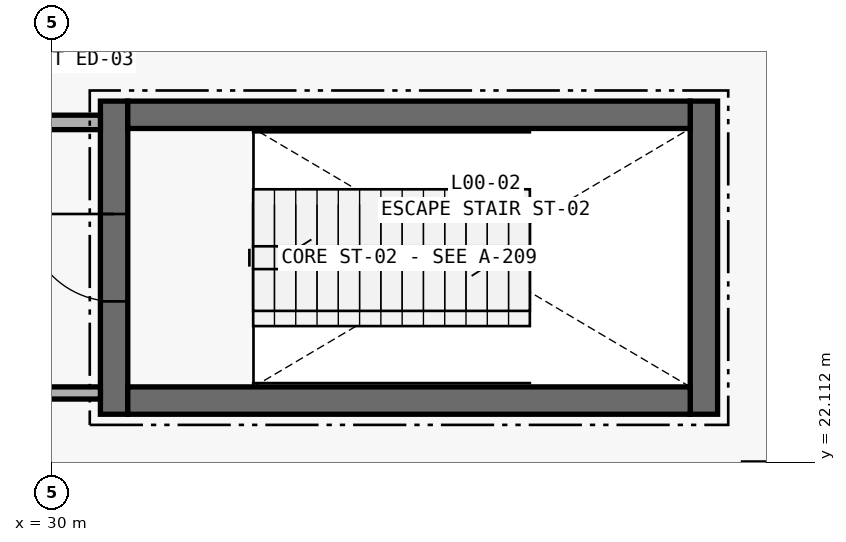
"""IFC4 building model, lengths in metres.
Left out: names, types, materials, properties, quantities, classifications, styles, units other than length and angle.
Written with IfcOpenShell. Run it as: python <this file> out.ifc"""

import sys

from ifc_helpers import new_model, si_unit, direction, frame, frame_2d, origin, place, context, subcontext, project, spatial, rectangle, extrude, element, fill, save


model = new_model("IFC4")
c1 = context("Model", 3, precision=1e-05, world=origin(), true_north=direction((0.0, 1.0)))
c2 = subcontext(c1, "Body", "Model", "MODEL_VIEW")
j1 = project(units=[si_unit("LENGTHUNIT", "METRE"), si_unit("PLANEANGLEUNIT", "RADIAN")], contexts=[c1])
p1 = place(None, origin())
s1 = spatial("IfcSite", under=j1, at=p1, CompositionType="ELEMENT")
p2 = place(p1, origin())
s2 = spatial("IfcBuilding", under=s1, at=p2, CompositionType="ELEMENT")
p3 = place(p2, origin())
s3 = spatial("IfcBuildingStorey", under=s2, at=p3, CompositionType="ELEMENT", Elevation=0.0)
p4 = place(p3, frame((30.82, 22.74, 0.0), z_axis=(0.0, 0.0, 1.0), x_axis=(0.0, 1.0, 0.0)))
e1 = element("IfcWall", 1, at=p4, inside=s3, PredefinedType="SHEAR", context=c2, shape_type="SweptSolid", body=[
    extrude(rectangle(XDim=4.12, YDim=0.36, at=frame_2d((2.06, 0.0))), origin(), (0.0, 0.0, 1.0), 4.5),
])
p5 = place(p4, frame((1.485, 0.0, 0.0)))
e2 = element("IfcOpeningElement", 2, at=p5, cuts=e1, PredefinedType="OPENING", context=c2, shape_type="SweptSolid", body=[
    extrude(rectangle(XDim=1.15, YDim=2.15, at=frame_2d((0.575, 1.075))), frame((0.0, 0.195, 0.0), z_axis=(0.0, -1.0, 0.0), x_axis=(1.0, 0.0, 0.0)), (0.0, 0.0, 1.0), 0.39),
])
p6 = place(p3, frame((38.58, 22.74, 0.0), z_axis=(0.0, 0.0, 1.0), x_axis=(0.0, 1.0, 0.0)))
e3 = element("IfcWall", 3, at=p6, inside=s3, PredefinedType="SHEAR", context=c2, shape_type="SweptSolid", body=[
    extrude(rectangle(XDim=4.12, YDim=0.36, at=frame_2d((2.06, 0.0))), origin(), (0.0, 0.0, 1.0), 4.5),
])
for number, where, z_axis, x_axis in (
    (4, (31.0, 26.68, 0.0), (0.0, 0.0, 1.0), (1.0, 0.0, 0.0)),
    (5, (31.0, 22.92, 0.0), (0.0, 0.0, 1.0), (1.0, 0.0, 0.0)),
):
    element("IfcWall", number, at=place(p3, frame(where, z_axis=z_axis, x_axis=x_axis)), inside=s3, PredefinedType="SHEAR", context=c2, shape_type="SweptSolid", body=[
        extrude(rectangle(XDim=7.4, YDim=0.36, at=frame_2d((3.7, 0.0))), origin(), (0.0, 0.0, 1.0), 4.5),
    ])
p7 = place(p3, frame((29.5, 23.02, 0.0), z_axis=(0.0, 0.0, 1.0), x_axis=(1.0, 0.0, 0.0)))
e6 = element("IfcWall", 6, at=p7, inside=s3, PredefinedType="PARTITIONING", context=c2, shape_type="SweptSolid", body=[
    extrude(rectangle(XDim=1.14, YDim=0.16, at=frame_2d((0.57, 0.0))), origin(), (0.0, 0.0, 1.0), 3.38),
])
p8 = place(p3, frame((26.625, 26.58, 0.0), z_axis=(0.0, 0.0, 1.0), x_axis=(1.0, 0.0, 0.0)))
e7 = element("IfcWall", 7, at=p8, inside=s3, PredefinedType="PARTITIONING", context=c2, shape_type="SweptSolid", body=[
    extrude(rectangle(XDim=4.015, YDim=0.19, at=frame_2d((2.007, 0.0))), origin(), (0.0, 0.0, 1.0), 3.38),
])
p9 = place(p5, origin())
e8 = element("IfcDoor", 8, at=p9, inside=s3, OperationType="SINGLE_SWING_RIGHT", PredefinedType="DOOR", context=c2, shape_type="SweptSolid", body=[
    extrude(rectangle(XDim=1.15, YDim=2.15, at=frame_2d((0.575, 1.075))), frame((0.0, 0.025, 0.0), z_axis=(0.0, -1.0, 0.0), x_axis=(1.0, 0.0, 0.0)), (0.0, 0.0, 1.0), 0.05),
])
fill(e2, e8)
save(model, sys.argv[1])
